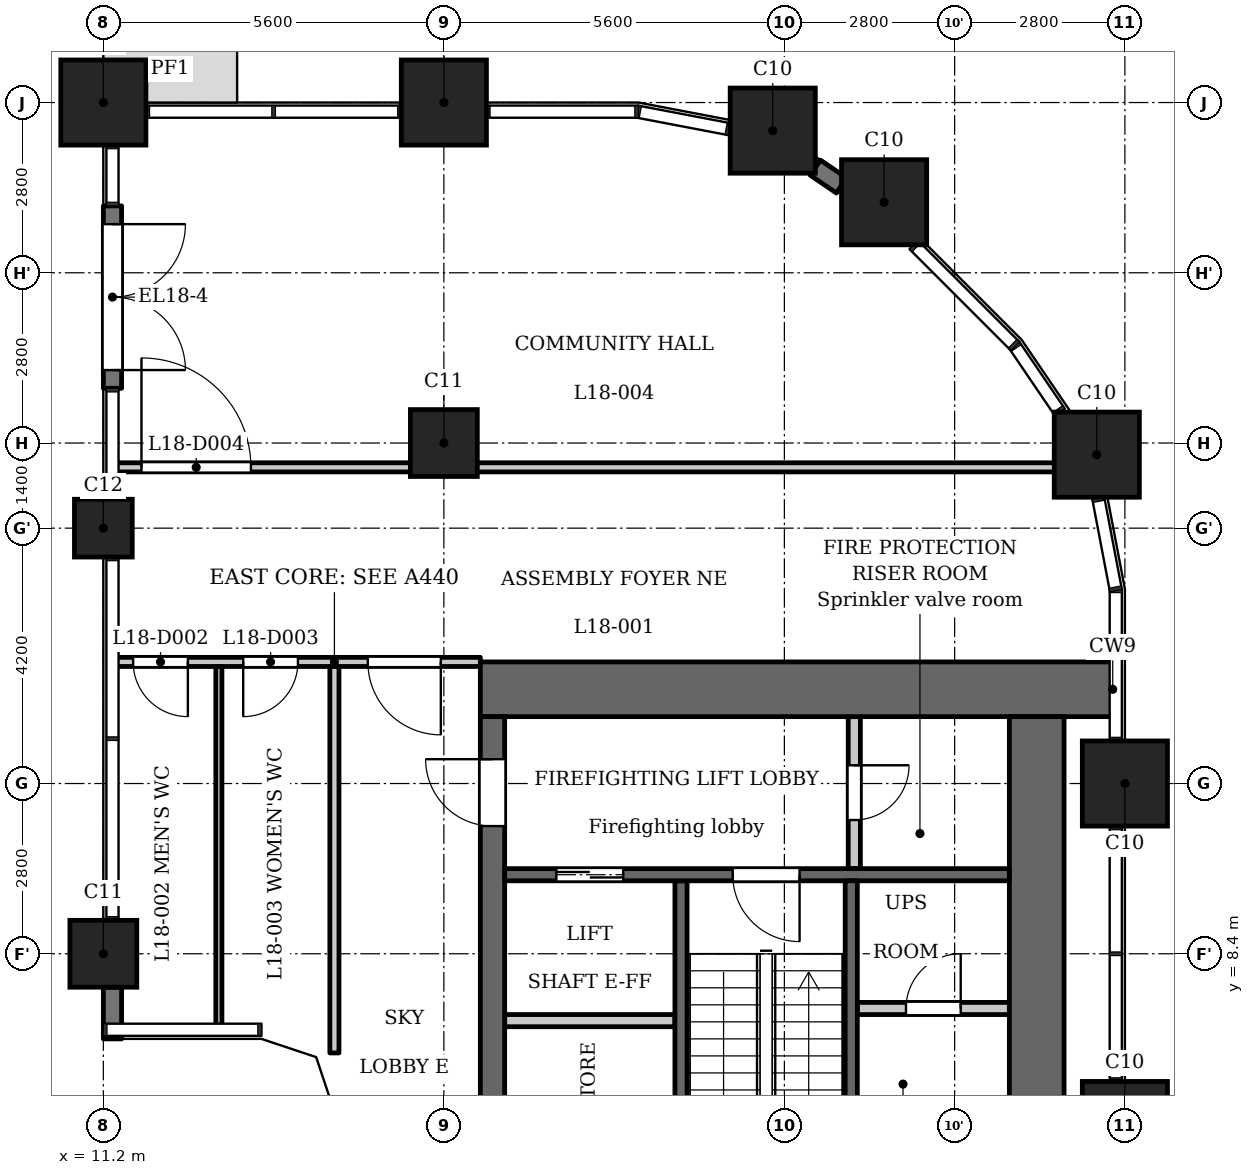
"""IFC4 building model, lengths in metres.
Left out: names, types, materials, properties, quantities, classifications, styles, units other than length and angle.
Written with IfcOpenShell. Run it as: python <this file> out.ifc"""

import sys

from ifc_helpers import new_model, si_unit, direction, frame, frame_2d, origin, origin_2d, place, context, subcontext, project, spatial, polyline, rectangle, outline, extrude, element, fill, save


model = new_model("IFC4")
c1 = context("Model", 3, precision=1e-05, world=origin(), true_north=direction((0.0, 1.0)))
c2 = subcontext(c1, "Body", "Model", "MODEL_VIEW")
j1 = project(units=[si_unit("LENGTHUNIT", "METRE"), si_unit("PLANEANGLEUNIT", "RADIAN")], contexts=[c1])
p1 = place(None, origin())
s1 = spatial("IfcSite", under=j1, at=p1, CompositionType="ELEMENT")
p2 = place(p1, origin())
s2 = spatial("IfcBuilding", under=s1, at=p2, CompositionType="ELEMENT")
p3 = place(p2, frame((0.0, 0.0, 72.5)))
s3 = spatial("IfcBuildingStorey", under=s2, at=p3, CompositionType="ELEMENT", Elevation=72.5)
for number, where, z_axis, x_axis in (
    (1, (28.0, 5.6, 0.0), (0.0, 0.0, 1.0), (1.0, 0.0, 0.0)),
    (2, (28.0, 11.2, 0.0), (0.0, 0.0, 1.0), (1.0, 0.0, 0.0)),
    (3, (27.538, 16.609, 0.0), (0.0, 0.0, 1.0), (1.0, 0.0, 0.0)),
    (4, (24.04, 20.76, 0.0), (0.0, 0.0, 1.0), (1.0, 0.0, 0.0)),
    (5, (22.209, 21.938, 0.0), (0.0, 0.0, 1.0), (1.0, 0.0, 0.0)),
    (6, (16.8, 22.4, 0.0), (0.0, 0.0, 1.0), (1.0, 0.0, 0.0)),
    (7, (11.2, 22.4, 0.0), (0.0, 0.0, 1.0), (1.0, 0.0, 0.0)),
):
    element("IfcColumn", number, at=place(p3, frame(where, z_axis=z_axis, x_axis=x_axis)), inside=s3, PredefinedType="COLUMN", context=c2, shape_type="SweptSolid", body=[
        extrude(rectangle(XDim=1.4, YDim=1.4, at=origin_2d()), origin(), (0.0, 0.0, 1.0), 5.4),
    ])
for number, where, z_axis, x_axis in (
    (8, (16.8, 16.8, 0.0), (0.0, 0.0, 1.0), (1.0, 0.0, 0.0)),
    (9, (11.2, 8.4, 0.0), (0.0, 0.0, 1.0), (1.0, 0.0, 0.0)),
):
    element("IfcColumn", number, at=place(p3, frame(where, z_axis=z_axis, x_axis=x_axis)), inside=s3, PredefinedType="COLUMN", context=c2, shape_type="SweptSolid", body=[
        extrude(rectangle(XDim=1.1, YDim=1.1, at=origin_2d()), origin(), (0.0, 0.0, 1.0), 5.4),
    ])
p4 = place(p3, frame((11.2, 15.4, 0.0), z_axis=(0.0, 0.0, 1.0), x_axis=(1.0, 0.0, 0.0)))
e10 = element("IfcColumn", 10, at=p4, inside=s3, PredefinedType="COLUMN", context=c2, shape_type="SweptSolid", body=[
    extrude(rectangle(XDim=0.95, YDim=0.95, at=origin_2d()), origin(), (0.0, 0.0, 1.0), 5.4),
])
p5 = place(p3, frame((11.35, 20.7, 0.0), z_axis=(0.0, 0.0, 1.0), x_axis=(0.0, -1.0, 0.0)))
e11 = element("IfcWall", 11, at=p5, inside=s3, PredefinedType="SOLIDWALL", context=c2, shape_type="SweptSolid", body=[
    extrude(rectangle(XDim=3.0, YDim=0.3, at=frame_2d((1.5, 0.0))), origin(), (0.0, 0.0, 1.0), 4.95),
])
p6 = place(p5, frame((0.3, 0.0, 0.0)))
e12 = element("IfcOpeningElement", 12, at=p6, cuts=e11, PredefinedType="OPENING", context=c2, shape_type="SweptSolid", body=[
    extrude(rectangle(XDim=2.4, YDim=2.3, at=frame_2d((1.2, 1.15))), frame((0.0, 0.16, 0.0), z_axis=(0.0, -1.0, 0.0), x_axis=(1.0, 0.0, 0.0)), (0.0, 0.0, 1.0), 0.32),
])
p7 = place(p3, frame((23.34, 21.036, 0.0), z_axis=(0.0, 0.0, 1.0), x_axis=(-0.827048360589, 0.562130775929, 0.0)))
e13 = element("IfcWall", 13, at=p7, inside=s3, PredefinedType="SOLIDWALL", context=c2, shape_type="SweptSolid", body=[
    extrude(rectangle(XDim=0.522, YDim=0.3, at=frame_2d((0.261, 0.0))), origin(), (0.0, 0.0, 1.0), 4.95),
])
p8 = place(p3, frame((11.35, 7.85, 0.0), z_axis=(0.0, 0.0, 1.0), x_axis=(0.0, -1.0, 0.0)))
e14 = element("IfcWall", 14, at=p8, inside=s3, PredefinedType="SOLIDWALL", context=c2, shape_type="SweptSolid", body=[
    extrude(rectangle(XDim=0.85, YDim=0.3, at=frame_2d((0.425, 0.0))), origin(), (0.0, 0.0, 1.0), 4.95),
])
p9 = place(p3, frame((20.7, 2.6, 0.0), z_axis=(0.0, 0.0, 1.0), x_axis=(0.0, 1.0, 0.0)))
e15 = element("IfcWall", 15, at=p9, inside=s3, PredefinedType="SHEAR", context=c2, shape_type="SweptSolid", body=[
    extrude(rectangle(XDim=7.0, YDim=0.2, at=frame_2d((3.5, 0.0))), origin(), (0.0, 0.0, 1.0), 4.95),
])
p10 = place(p3, frame((17.4, 12.75, 0.0), z_axis=(0.0, 0.0, 1.0), x_axis=(1.0, 0.0, 0.0)))
e16 = element("IfcWall", 16, at=p10, inside=s3, PredefinedType="SHEAR", context=c2, shape_type="SweptSolid", body=[
    extrude(rectangle(XDim=10.4, YDim=0.9, at=frame_2d((5.2, 0.0))), origin(), (0.0, 0.0, 1.0), 4.95),
])
p11 = place(p3, frame((17.6, -12.3, 0.0), z_axis=(0.0, 0.0, 1.0), x_axis=(0.0, 1.0, 0.0)))
e17 = element("IfcWall", 17, at=p11, inside=s3, PredefinedType="SHEAR", context=c2, shape_type="SweptSolid", body=[
    extrude(rectangle(XDim=24.6, YDim=0.4, at=frame_2d((12.3, 0.0))), origin(), (0.0, 0.0, 1.0), 4.95),
])
p12 = place(p11, frame((6.0, 0.0, 0.0)))
e18 = element("IfcOpeningElement", 18, at=p12, cuts=e17, PredefinedType="OPENING", context=c2, shape_type="SweptSolid", body=[
    extrude(rectangle(XDim=1.1, YDim=2.1, at=frame_2d((0.55, 1.05))), frame((0.0, 0.21, 0.0), z_axis=(0.0, -1.0, 0.0), x_axis=(1.0, 0.0, 0.0)), (0.0, 0.0, 1.0), 0.42),
])
p13 = place(p11, frame((8.4, 0.0, 0.0)))
e19 = element("IfcOpeningElement", 19, at=p13, cuts=e17, PredefinedType="OPENING", context=c2, shape_type="SweptSolid", body=[
    extrude(rectangle(XDim=1.1, YDim=2.1, at=frame_2d((0.55, 1.05))), frame((0.0, 0.21, 0.0), z_axis=(0.0, -1.0, 0.0), x_axis=(1.0, 0.0, 0.0)), (0.0, 0.0, 1.0), 0.42),
])
p14 = place(p11, frame((10.8, 0.0, 0.0)))
e20 = element("IfcOpeningElement", 20, at=p14, cuts=e17, PredefinedType="OPENING", context=c2, shape_type="SweptSolid", body=[
    extrude(rectangle(XDim=1.1, YDim=2.1, at=frame_2d((0.55, 1.05))), frame((0.0, 0.21, 0.0), z_axis=(0.0, -1.0, 0.0), x_axis=(1.0, 0.0, 0.0)), (0.0, 0.0, 1.0), 0.42),
])
p15 = place(p11, frame((16.75, 0.0, 0.0)))
e21 = element("IfcOpeningElement", 21, at=p15, cuts=e17, PredefinedType="OPENING", context=c2, shape_type="SweptSolid", body=[
    extrude(rectangle(XDim=0.9, YDim=2.1, at=frame_2d((0.45, 1.05))), frame((0.0, 0.21, 0.0), z_axis=(0.0, -1.0, 0.0), x_axis=(1.0, 0.0, 0.0)), (0.0, 0.0, 1.0), 0.42),
])
p16 = place(p11, frame((22.8, 0.0, 0.0)))
e22 = element("IfcOpeningElement", 22, at=p16, cuts=e17, PredefinedType="OPENING", context=c2, shape_type="SweptSolid", body=[
    extrude(rectangle(XDim=1.1, YDim=2.1, at=frame_2d((0.55, 1.05))), frame((0.0, 0.21, 0.0), z_axis=(0.0, -1.0, 0.0), x_axis=(1.0, 0.0, 0.0)), (0.0, 0.0, 1.0), 0.42),
])
p17 = place(p11, frame((0.7, 0.0, 0.0)))
e23 = element("IfcOpeningElement", 23, at=p17, cuts=e17, PredefinedType="OPENING", context=c2, shape_type="SweptSolid", body=[
    extrude(rectangle(XDim=1.1, YDim=2.1, at=frame_2d((0.55, 1.05))), frame((0.0, 0.21, 0.0), z_axis=(0.0, -1.0, 0.0), x_axis=(1.0, 0.0, 0.0)), (0.0, 0.0, 1.0), 0.42),
])
p18 = place(p11, frame((12.775, 0.0, 0.0)))
e24 = element("IfcOpeningElement", 24, at=p18, cuts=e17, PredefinedType="OPENING", context=c2, shape_type="SweptSolid", body=[
    extrude(rectangle(XDim=1.8, YDim=2.1, at=frame_2d((0.9, 1.05))), frame((0.0, 0.21, 0.0), z_axis=(0.0, -1.0, 0.0), x_axis=(1.0, 0.0, 0.0)), (0.0, 0.0, 1.0), 0.42),
])
p19 = place(p3, frame((26.55, -12.3, 0.0), z_axis=(0.0, 0.0, 1.0), x_axis=(0.0, 1.0, 0.0)))
e25 = element("IfcWall", 25, at=p19, inside=s3, PredefinedType="SHEAR", context=c2, shape_type="SweptSolid", body=[
    extrude(rectangle(XDim=24.6, YDim=0.9, at=frame_2d((12.3, 0.0))), origin(), (0.0, 0.0, 1.0), 4.95),
])
p20 = place(p3, frame((23.55, 9.8, 0.0), z_axis=(0.0, 0.0, 1.0), x_axis=(0.0, 1.0, 0.0)))
e26 = element("IfcWall", 26, at=p20, inside=s3, PredefinedType="PARTITIONING", context=c2, shape_type="SweptSolid", body=[
    extrude(rectangle(XDim=2.5, YDim=0.2, at=frame_2d((1.25, 0.0))), origin(), (0.0, 0.0, 1.0), 4.95),
])
p21 = place(p20, frame((0.8, 0.0, 0.0)))
e27 = element("IfcOpeningElement", 27, at=p21, cuts=e26, PredefinedType="OPENING", context=c2, shape_type="SweptSolid", body=[
    extrude(rectangle(XDim=0.9, YDim=2.1, at=frame_2d((0.45, 1.05))), frame((0.0, 0.11, 0.0), z_axis=(0.0, -1.0, 0.0), x_axis=(1.0, 0.0, 0.0)), (0.0, 0.0, 1.0), 0.22),
])
p22 = place(p3, frame((23.6, 7.5, 0.0), z_axis=(0.0, 0.0, 1.0), x_axis=(1.0, 0.0, 0.0)))
e28 = element("IfcWall", 28, at=p22, inside=s3, PredefinedType="PARTITIONING", context=c2, shape_type="SweptSolid", body=[
    extrude(rectangle(XDim=2.5, YDim=0.2, at=frame_2d((1.25, 0.0))), origin(), (0.0, 0.0, 1.0), 4.95),
])
p23 = place(p22, frame((0.8, 0.0, 0.0)))
e29 = element("IfcOpeningElement", 29, at=p23, cuts=e28, PredefinedType="OPENING", context=c2, shape_type="SweptSolid", body=[
    extrude(rectangle(XDim=0.9, YDim=2.1, at=frame_2d((0.45, 1.05))), frame((0.0, 0.11, 0.0), z_axis=(0.0, -1.0, 0.0), x_axis=(1.0, 0.0, 0.0)), (0.0, 0.0, 1.0), 0.22),
])
p24 = place(p3, frame((17.8, 7.3, 0.0), z_axis=(0.0, 0.0, 1.0), x_axis=(1.0, 0.0, 0.0)))
e30 = element("IfcWall", 30, at=p24, inside=s3, PredefinedType="PARTITIONING", context=c2, shape_type="SweptSolid", body=[
    extrude(rectangle(XDim=2.8, YDim=0.2, at=frame_2d((1.4, 0.0))), origin(), (0.0, 0.0, 1.0), 4.95),
])
p25 = place(p3, frame((17.8, 9.7, 0.0), z_axis=(0.0, 0.0, 1.0), x_axis=(1.0, 0.0, 0.0)))
e31 = element("IfcWall", 31, at=p25, inside=s3, PredefinedType="SHEAR", context=c2, shape_type="SweptSolid", body=[
    extrude(rectangle(XDim=8.3, YDim=0.2, at=frame_2d((4.15, 0.0))), origin(), (0.0, 0.0, 1.0), 4.95),
])
p26 = place(p25, frame((0.85, 0.0, 0.0)))
e32 = element("IfcOpeningElement", 32, at=p26, cuts=e31, PredefinedType="OPENING", context=c2, shape_type="SweptSolid", body=[
    extrude(rectangle(XDim=1.1, YDim=2.1, at=frame_2d((0.55, 1.05))), frame((0.0, 0.11, 0.0), z_axis=(0.0, -1.0, 0.0), x_axis=(1.0, 0.0, 0.0)), (0.0, 0.0, 1.0), 0.22),
])
p27 = place(p25, frame((3.75, 0.0, 0.0)))
e33 = element("IfcOpeningElement", 33, at=p27, cuts=e31, PredefinedType="OPENING", context=c2, shape_type="SweptSolid", body=[
    extrude(rectangle(XDim=1.1, YDim=2.1, at=frame_2d((0.55, 1.05))), frame((0.0, 0.11, 0.0), z_axis=(0.0, -1.0, 0.0), x_axis=(1.0, 0.0, 0.0)), (0.0, 0.0, 1.0), 0.22),
])
p28 = place(p3, frame((23.5, 2.6, 0.0), z_axis=(0.0, 0.0, 1.0), x_axis=(0.0, 1.0, 0.0)))
e34 = element("IfcWall", 34, at=p28, inside=s3, PredefinedType="SHEAR", context=c2, shape_type="SweptSolid", body=[
    extrude(rectangle(XDim=7.0, YDim=0.2, at=frame_2d((3.5, 0.0))), origin(), (0.0, 0.0, 1.0), 4.95),
])
p29 = place(p3, frame((11.384, 13.2, 0.0), z_axis=(0.0, 0.0, 1.0), x_axis=(1.0, 0.0, 0.0)))
e35 = element("IfcWall", 35, at=p29, inside=s3, PredefinedType="PARTITIONING", context=c2, shape_type="SweptSolid", body=[
    extrude(rectangle(XDim=6.016, YDim=0.15, at=frame_2d((3.008, 0.0))), origin(), (0.0, 0.0, 1.0), 4.95),
])
p30 = place(p29, frame((4.166, 0.0, 0.0)))
e36 = element("IfcOpeningElement", 36, at=p30, cuts=e35, PredefinedType="OPENING", context=c2, shape_type="SweptSolid", body=[
    extrude(rectangle(XDim=1.2, YDim=2.1, at=frame_2d((0.6, 1.05))), frame((0.0, 0.085, 0.0), z_axis=(0.0, -1.0, 0.0), x_axis=(1.0, 0.0, 0.0)), (0.0, 0.0, 1.0), 0.17),
])
p31 = place(p29, frame((0.306, 0.0, 0.0)))
e37 = element("IfcOpeningElement", 37, at=p31, cuts=e35, PredefinedType="OPENING", context=c2, shape_type="SweptSolid", body=[
    extrude(rectangle(XDim=0.9, YDim=2.1, at=frame_2d((0.45, 1.05))), frame((0.0, 0.085, 0.0), z_axis=(0.0, -1.0, 0.0), x_axis=(1.0, 0.0, 0.0)), (0.0, 0.0, 1.0), 0.17),
])
p32 = place(p29, frame((2.116, 0.0, 0.0)))
e38 = element("IfcOpeningElement", 38, at=p32, cuts=e35, PredefinedType="OPENING", context=c2, shape_type="SweptSolid", body=[
    extrude(rectangle(XDim=0.9, YDim=2.1, at=frame_2d((0.45, 1.05))), frame((0.0, 0.085, 0.0), z_axis=(0.0, -1.0, 0.0), x_axis=(1.0, 0.0, 0.0)), (0.0, 0.0, 1.0), 0.17),
])
p33 = place(p3, frame((11.384, 16.4, 0.0), z_axis=(0.0, 0.0, 1.0), x_axis=(1.0, 0.0, 0.0)))
e39 = element("IfcWall", 39, at=p33, inside=s3, PredefinedType="PARTITIONING", context=c2, shape_type="SweptSolid", body=[
    extrude(rectangle(XDim=16.136, YDim=0.15, at=frame_2d((8.068, 0.0))), origin(), (0.0, 0.0, 1.0), 4.95),
])
p34 = place(p33, frame((0.443, 0.0, 0.0)))
e40 = element("IfcOpeningElement", 40, at=p34, cuts=e39, PredefinedType="OPENING", context=c2, shape_type="SweptSolid", body=[
    extrude(rectangle(XDim=1.8, YDim=2.1, at=frame_2d((0.9, 1.05))), frame((0.0, 0.085, 0.0), z_axis=(0.0, -1.0, 0.0), x_axis=(1.0, 0.0, 0.0)), (0.0, 0.0, 1.0), 0.17),
])
p35 = place(p3, frame((13.1, 7.184, 0.0), z_axis=(0.0, 0.0, 1.0), x_axis=(0.0, 1.0, 0.0)))
e41 = element("IfcWall", 41, at=p35, inside=s3, PredefinedType="PARTITIONING", context=c2, shape_type="SweptSolid", body=[
    extrude(rectangle(XDim=5.941, YDim=0.1, at=frame_2d((2.97, 0.0))), origin(), (0.0, 0.0, 1.0), 4.95),
])
p36 = place(p3, frame((15.0, 6.769, 0.0), z_axis=(0.0, 0.0, 1.0), x_axis=(0.0, 1.0, 0.0)))
e42 = element("IfcWall", 42, at=p36, inside=s3, PredefinedType="PARTITIONING", context=c2, shape_type="SweptSolid", body=[
    extrude(rectangle(XDim=6.356, YDim=0.15, at=frame_2d((3.178, 0.0))), origin(), (0.0, 0.0, 1.0), 4.95),
])
p37 = place(p3, origin())
e43 = element("IfcWall", 43, at=p37, inside=s3, PredefinedType="SOLIDWALL", context=c2, shape_type="SweptSolid", body=[
    extrude(outline(polyline([(13.8, 7.0), (14.7, 6.7), (15.0, 5.8), (15.3, 5.8), (15.3, 5.849), (14.937, 6.937), (13.849, 7.3), (13.8, 7.3), (13.8, 7.0)])), origin(), (0.0, 0.0, 1.0), 4.95),
])
p38 = place(p6, origin())
e44 = element("IfcDoor", 44, at=p38, inside=s3, OperationType="SINGLE_SWING_LEFT", PredefinedType="DOOR", context=c2, shape_type="SweptSolid", body=[
    extrude(rectangle(XDim=2.4, YDim=2.3, at=frame_2d((1.2, 1.15))), frame((0.0, 0.025, 0.0), z_axis=(0.0, -1.0, 0.0), x_axis=(1.0, 0.0, 0.0)), (0.0, 0.0, 1.0), 0.05),
])
fill(e12, e44)
p39 = place(p26, origin())
e45 = element("IfcDoor", 45, at=p39, inside=s3, OperationType="DOUBLE_DOOR_SLIDING", PredefinedType="DOOR", context=c2, shape_type="SweptSolid", body=[
    extrude(rectangle(XDim=1.1, YDim=2.1, at=frame_2d((0.55, 1.05))), frame((0.0, 0.025, 0.0), z_axis=(0.0, -1.0, 0.0), x_axis=(1.0, 0.0, 0.0)), (0.0, 0.0, 1.0), 0.05),
])
fill(e32, e45)
p40 = place(p16, origin())
e46 = element("IfcDoor", 46, at=p40, inside=s3, OperationType="SINGLE_SWING_LEFT", PredefinedType="DOOR", context=c2, shape_type="SweptSolid", body=[
    extrude(rectangle(XDim=1.1, YDim=2.1, at=frame_2d((0.55, 1.05))), frame((0.0, 0.025, 0.0), z_axis=(0.0, -1.0, 0.0), x_axis=(1.0, 0.0, 0.0)), (0.0, 0.0, 1.0), 0.05),
])
fill(e22, e46)
p41 = place(p21, origin())
e47 = element("IfcDoor", 47, at=p41, inside=s3, OperationType="SINGLE_SWING_RIGHT", PredefinedType="DOOR", context=c2, shape_type="SweptSolid", body=[
    extrude(rectangle(XDim=0.9, YDim=2.1, at=frame_2d((0.45, 1.05))), frame((0.0, 0.025, 0.0), z_axis=(0.0, -1.0, 0.0), x_axis=(1.0, 0.0, 0.0)), (0.0, 0.0, 1.0), 0.05),
])
fill(e27, e47)
p42 = place(p27, origin())
e48 = element("IfcDoor", 48, at=p42, inside=s3, OperationType="SINGLE_SWING_RIGHT", PredefinedType="DOOR", context=c2, shape_type="SweptSolid", body=[
    extrude(rectangle(XDim=1.1, YDim=2.1, at=frame_2d((0.55, 1.05))), frame((0.0, 0.025, 0.0), z_axis=(0.0, -1.0, 0.0), x_axis=(1.0, 0.0, 0.0)), (0.0, 0.0, 1.0), 0.05),
])
fill(e33, e48)
p43 = place(p23, origin())
e49 = element("IfcDoor", 49, at=p43, inside=s3, OperationType="SINGLE_SWING_LEFT", PredefinedType="DOOR", context=c2, shape_type="SweptSolid", body=[
    extrude(rectangle(XDim=0.9, YDim=2.1, at=frame_2d((0.45, 1.05))), frame((0.0, 0.025, 0.0), z_axis=(0.0, -1.0, 0.0), x_axis=(1.0, 0.0, 0.0)), (0.0, 0.0, 1.0), 0.05),
])
fill(e29, e49)
p44 = place(p30, origin())
e50 = element("IfcDoor", 50, at=p44, inside=s3, OperationType="SINGLE_SWING_RIGHT", PredefinedType="DOOR", context=c2, shape_type="SweptSolid", body=[
    extrude(rectangle(XDim=1.2, YDim=2.1, at=frame_2d((0.6, 1.05))), frame((0.0, 0.025, 0.0), z_axis=(0.0, -1.0, 0.0), x_axis=(1.0, 0.0, 0.0)), (0.0, 0.0, 1.0), 0.05),
])
fill(e36, e50)
p45 = place(p31, origin())
e51 = element("IfcDoor", 51, at=p45, inside=s3, OperationType="SINGLE_SWING_RIGHT", PredefinedType="DOOR", context=c2, shape_type="SweptSolid", body=[
    extrude(rectangle(XDim=0.9, YDim=2.1, at=frame_2d((0.45, 1.05))), frame((0.0, 0.025, 0.0), z_axis=(0.0, -1.0, 0.0), x_axis=(1.0, 0.0, 0.0)), (0.0, 0.0, 1.0), 0.05),
])
fill(e37, e51)
p46 = place(p32, origin())
e52 = element("IfcDoor", 52, at=p46, inside=s3, OperationType="SINGLE_SWING_LEFT", PredefinedType="DOOR", context=c2, shape_type="SweptSolid", body=[
    extrude(rectangle(XDim=0.9, YDim=2.1, at=frame_2d((0.45, 1.05))), frame((0.0, 0.025, 0.0), z_axis=(0.0, -1.0, 0.0), x_axis=(1.0, 0.0, 0.0)), (0.0, 0.0, 1.0), 0.05),
])
fill(e38, e52)
p47 = place(p34, origin())
e53 = element("IfcDoor", 53, at=p47, inside=s3, OperationType="SINGLE_SWING_RIGHT", PredefinedType="DOOR", context=c2, shape_type="SweptSolid", body=[
    extrude(rectangle(XDim=1.8, YDim=2.1, at=frame_2d((0.9, 1.05))), frame((0.0, 0.025, 0.0), z_axis=(0.0, -1.0, 0.0), x_axis=(1.0, 0.0, 0.0)), (0.0, 0.0, 1.0), 0.05),
])
fill(e40, e53)
save(model, sys.argv[1])
